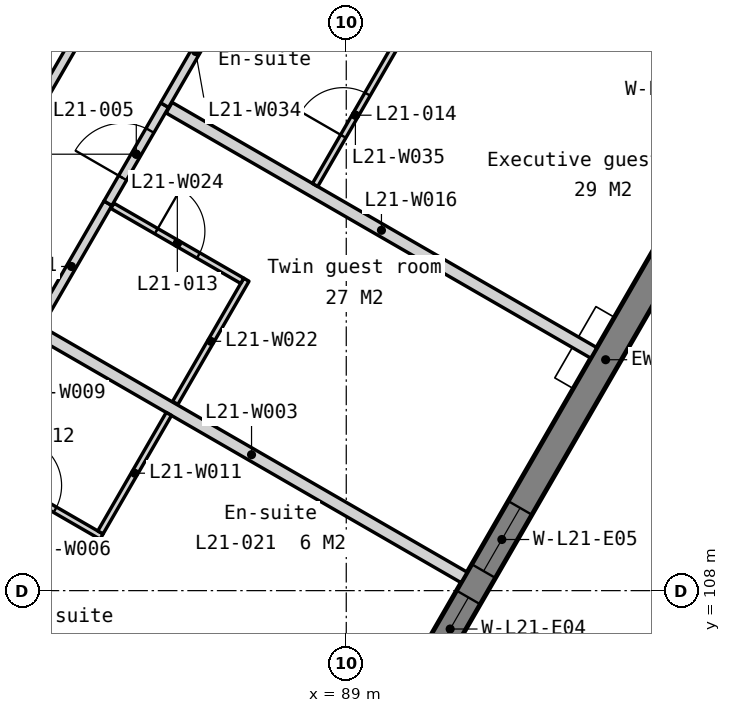
"""IFC4 building model, lengths in metres.
Left out: names, types, materials, properties, quantities, classifications, styles, units other than length and angle.
Written with IfcOpenShell. Run it as: python <this file> out.ifc"""

import sys

from ifc_helpers import new_model, si_unit, direction, frame, frame_2d, origin, place, context, subcontext, project, spatial, polyline, rectangle, outline, extrude, element, fill, save


model = new_model("IFC4")
c1 = context("Model", 3, precision=1e-05, world=origin(), true_north=direction((0.0, 1.0)))
c2 = subcontext(c1, "Body", "Model", "MODEL_VIEW")
j1 = project(units=[si_unit("LENGTHUNIT", "METRE"), si_unit("PLANEANGLEUNIT", "RADIAN")], contexts=[c1])
p1 = place(None, origin())
s1 = spatial("IfcSite", under=j1, at=p1, CompositionType="ELEMENT")
p2 = place(p1, origin())
s2 = spatial("IfcBuilding", under=s1, at=p2, CompositionType="ELEMENT")
p3 = place(p2, frame((0.0, 0.0, 88.8)))
s3 = spatial("IfcBuildingStorey", under=s2, at=p3, CompositionType="ELEMENT", Elevation=88.8)
p4 = place(p3, frame((82.605, 93.333, -0.15), z_axis=(0.0, 0.0, 1.0), x_axis=(0.500000478905, 0.866025127289, 0.0)))
e1 = element("IfcWall", 1, at=p4, inside=s3, PredefinedType="SOLIDWALL", context=c2, shape_type="SweptSolid", body=[
    extrude(outline(polyline([(42.643, 0.0), (42.643, 3.5), (0.0, 3.5), (0.0, 0.0), (42.643, 0.0)])), frame((0.0, 0.225, 0.0), z_axis=(0.0, -1.0, 0.0), x_axis=(1.0, 0.0, 0.0)), (0.0, 0.0, 1.0), 0.45),
])
p5 = place(p4, frame((0.72, 0.0, 1.05)))
e2 = element("IfcOpeningElement", 2, at=p5, cuts=e1, PredefinedType="OPENING", context=c2, shape_type="SweptSolid", body=[
    extrude(rectangle(XDim=1.2, YDim=1.5, at=frame_2d((0.6, 0.75))), frame((0.0, 0.235, 0.0), z_axis=(0.0, -1.0, 0.0), x_axis=(1.0, 0.0, 0.0)), (0.0, 0.0, 1.0), 0.47),
])
p6 = place(p4, frame((7.079, 0.0, 1.05)))
e3 = element("IfcOpeningElement", 3, at=p6, cuts=e1, PredefinedType="OPENING", context=c2, shape_type="SweptSolid", body=[
    extrude(rectangle(XDim=1.2, YDim=1.5, at=frame_2d((0.6, 0.75))), frame((0.0, 0.235, 0.0), z_axis=(0.0, -1.0, 0.0), x_axis=(1.0, 0.0, 0.0)), (0.0, 0.0, 1.0), 0.47),
])
p7 = place(p4, frame((8.779, 0.0, 1.05)))
e4 = element("IfcOpeningElement", 4, at=p7, cuts=e1, PredefinedType="OPENING", context=c2, shape_type="SweptSolid", body=[
    extrude(rectangle(XDim=1.2, YDim=1.5, at=frame_2d((0.6, 0.75))), frame((0.0, 0.235, 0.0), z_axis=(0.0, -1.0, 0.0), x_axis=(1.0, 0.0, 0.0)), (0.0, 0.0, 1.0), 0.47),
])
p8 = place(p4, frame((15.607, 0.0, 1.05)))
e5 = element("IfcOpeningElement", 5, at=p8, cuts=e1, PredefinedType="OPENING", context=c2, shape_type="SweptSolid", body=[
    extrude(rectangle(XDim=1.2, YDim=1.5, at=frame_2d((0.6, 0.75))), frame((0.0, 0.235, 0.0), z_axis=(0.0, -1.0, 0.0), x_axis=(1.0, 0.0, 0.0)), (0.0, 0.0, 1.0), 0.47),
])
p9 = place(p4, frame((17.307, 0.0, 1.05)))
e6 = element("IfcOpeningElement", 6, at=p9, cuts=e1, PredefinedType="OPENING", context=c2, shape_type="SweptSolid", body=[
    extrude(rectangle(XDim=1.2, YDim=1.5, at=frame_2d((0.6, 0.75))), frame((0.0, 0.235, 0.0), z_axis=(0.0, -1.0, 0.0), x_axis=(1.0, 0.0, 0.0)), (0.0, 0.0, 1.0), 0.47),
])
p10 = place(p4, frame((24.136, 0.0, 1.05)))
e7 = element("IfcOpeningElement", 7, at=p10, cuts=e1, PredefinedType="OPENING", context=c2, shape_type="SweptSolid", body=[
    extrude(rectangle(XDim=1.2, YDim=1.5, at=frame_2d((0.6, 0.75))), frame((0.0, 0.235, 0.0), z_axis=(0.0, -1.0, 0.0), x_axis=(1.0, 0.0, 0.0)), (0.0, 0.0, 1.0), 0.47),
])
p11 = place(p4, frame((25.836, 0.0, 1.05)))
e8 = element("IfcOpeningElement", 8, at=p11, cuts=e1, PredefinedType="OPENING", context=c2, shape_type="SweptSolid", body=[
    extrude(rectangle(XDim=1.2, YDim=1.5, at=frame_2d((0.6, 0.75))), frame((0.0, 0.235, 0.0), z_axis=(0.0, -1.0, 0.0), x_axis=(1.0, 0.0, 0.0)), (0.0, 0.0, 1.0), 0.47),
])
p12 = place(p4, frame((32.665, 0.0, 1.05)))
e9 = element("IfcOpeningElement", 9, at=p12, cuts=e1, PredefinedType="OPENING", context=c2, shape_type="SweptSolid", body=[
    extrude(rectangle(XDim=1.2, YDim=1.5, at=frame_2d((0.6, 0.75))), frame((0.0, 0.235, 0.0), z_axis=(0.0, -1.0, 0.0), x_axis=(1.0, 0.0, 0.0)), (0.0, 0.0, 1.0), 0.47),
])
p13 = place(p4, frame((34.365, 0.0, 1.05)))
e10 = element("IfcOpeningElement", 10, at=p13, cuts=e1, PredefinedType="OPENING", context=c2, shape_type="SweptSolid", body=[
    extrude(rectangle(XDim=1.2, YDim=1.5, at=frame_2d((0.6, 0.75))), frame((0.0, 0.235, 0.0), z_axis=(0.0, -1.0, 0.0), x_axis=(1.0, 0.0, 0.0)), (0.0, 0.0, 1.0), 0.47),
])
p14 = place(p4, frame((40.722, 0.0, 1.05)))
e11 = element("IfcOpeningElement", 11, at=p14, cuts=e1, PredefinedType="OPENING", context=c2, shape_type="SweptSolid", body=[
    extrude(rectangle(XDim=1.2, YDim=1.5, at=frame_2d((0.6, 0.75))), frame((0.0, 0.235, 0.0), z_axis=(0.0, -1.0, 0.0), x_axis=(1.0, 0.0, 0.0)), (0.0, 0.0, 1.0), 0.47),
])
p15 = place(p3, frame((83.946, 112.255, 0.0), z_axis=(0.0, 0.0, 1.0), x_axis=(0.86603353517, -0.499985915763, 0.0)))
e12 = element("IfcWall", 12, at=p15, inside=s3, PredefinedType="PARTITIONING", context=c2, shape_type="SweptSolid", body=[
    extrude(rectangle(XDim=8.075, YDim=0.2, at=frame_2d((4.038, 0.0))), origin(), (0.0, 0.0, 1.0), 3.35),
])
p16 = place(p3, frame((82.754, 110.171, 0.0), z_axis=(0.0, 0.0, 1.0), x_axis=(0.866038183914, -0.499977863513, 0.0)))
e13 = element("IfcWall", 13, at=p16, inside=s3, PredefinedType="PARTITIONING", context=c2, shape_type="SweptSolid", body=[
    extrude(rectangle(XDim=2.565, YDim=0.1, at=frame_2d((1.282, 0.0))), origin(), (0.0, 0.0, 1.0), 3.35),
])
p17 = place(p16, frame((0.883, 0.0, 0.0)))
e14 = element("IfcOpeningElement", 14, at=p17, cuts=e13, PredefinedType="OPENING", context=c2, shape_type="SweptSolid", body=[
    extrude(rectangle(XDim=0.8, YDim=2.1, at=frame_2d((0.4, 1.05))), frame((0.0, 0.06, 0.0), z_axis=(0.0, -1.0, 0.0), x_axis=(1.0, 0.0, 0.0)), (0.0, 0.0, 1.0), 0.12),
])
p18 = place(p3, frame((84.958, 108.957, 0.0), z_axis=(0.0, 0.0, 1.0), x_axis=(0.499966648284, 0.866044658551, 0.0)))
e15 = element("IfcWall", 15, at=p18, inside=s3, PredefinedType="PARTITIONING", context=c2, shape_type="SweptSolid", body=[
    extrude(rectangle(XDim=2.25, YDim=0.1, at=frame_2d((1.125, 0.0))), origin(), (0.0, 0.0, 1.0), 3.35),
])
p19 = place(p3, frame((86.087, 115.943, 0.0), z_axis=(0.0, 0.0, 1.0), x_axis=(0.866010152247, -0.500026415507, 0.0)))
e16 = element("IfcWall", 16, at=p19, inside=s3, PredefinedType="PARTITIONING", context=c2, shape_type="SweptSolid", body=[
    extrude(rectangle(XDim=8.065, YDim=0.2, at=frame_2d((4.032, 0.0))), origin(), (0.0, 0.0, 1.0), 3.35),
])
p20 = place(p3, frame((83.881, 112.292, 0.0), z_axis=(0.0, 0.0, 1.0), x_axis=(0.500001309137, 0.866024647952, 0.0)))
e17 = element("IfcWall", 17, at=p20, inside=s3, PredefinedType="PARTITIONING", context=c2, shape_type="SweptSolid", body=[
    extrude(rectangle(XDim=2.4, YDim=0.15, at=frame_2d((1.2, 0.0))), origin(), (0.0, 0.0, 1.0), 3.35),
])
p21 = place(p3, frame((86.188, 111.088, 0.0), z_axis=(0.0, 0.0, 1.0), x_axis=(0.499999433879, 0.866025730634, 0.0)))
e18 = element("IfcWall", 18, at=p21, inside=s3, PredefinedType="PARTITIONING", context=c2, shape_type="SweptSolid", body=[
    extrude(rectangle(XDim=2.34, YDim=0.1, at=frame_2d((1.17, 0.0))), origin(), (0.0, 0.0, 1.0), 3.35),
])
p22 = place(p3, frame((85.154, 114.328, 0.0), z_axis=(0.0, 0.0, 1.0), x_axis=(0.866040446274, -0.499973944738, 0.0)))
e19 = element("IfcWall", 19, at=p22, inside=s3, PredefinedType="PARTITIONING", context=c2, shape_type="SweptSolid", body=[
    extrude(rectangle(XDim=2.465, YDim=0.1, at=frame_2d((1.232, 0.0))), origin(), (0.0, 0.0, 1.0), 3.35),
])
p23 = place(p22, frame((0.833, 0.0, 0.0)))
e20 = element("IfcOpeningElement", 20, at=p23, cuts=e19, PredefinedType="OPENING", context=c2, shape_type="SweptSolid", body=[
    extrude(rectangle(XDim=0.8, YDim=2.1, at=frame_2d((0.4, 1.05))), frame((0.0, 0.06, 0.0), z_axis=(0.0, -1.0, 0.0), x_axis=(1.0, 0.0, 0.0)), (0.0, 0.0, 1.0), 0.12),
])
p24 = place(p3, frame((85.081, 114.371, 0.0), z_axis=(0.0, 0.0, 1.0), x_axis=(0.499941596792, 0.866059120267, 0.0)))
e21 = element("IfcWall", 21, at=p24, inside=s3, PredefinedType="PARTITIONING", context=c2, shape_type="SweptSolid", body=[
    extrude(rectangle(XDim=1.865, YDim=0.15, at=frame_2d((0.932, 0.0))), origin(), (0.0, 0.0, 1.0), 3.35),
])
p25 = place(p24, frame((0.482, 0.0, 0.0)))
e22 = element("IfcOpeningElement", 22, at=p25, cuts=e21, PredefinedType="OPENING", context=c2, shape_type="SweptSolid", body=[
    extrude(rectangle(XDim=0.9, YDim=2.1, at=frame_2d((0.45, 1.05))), frame((0.0, 0.085, 0.0), z_axis=(0.0, -1.0, 0.0), x_axis=(1.0, 0.0, 0.0)), (0.0, 0.0, 1.0), 0.17),
])
p26 = place(p3, frame((86.013, 115.985, 0.0), z_axis=(0.0, 0.0, 1.0), x_axis=(0.499992114976, 0.866029956157, 0.0)))
e23 = element("IfcWall", 23, at=p26, inside=s3, PredefinedType="PARTITIONING", context=c2, shape_type="SweptSolid", body=[
    extrude(rectangle(XDim=2.038, YDim=0.15, at=frame_2d((1.019, 0.0))), origin(), (0.0, 0.0, 1.0), 3.35),
])
p27 = place(p3, frame((88.488, 114.672, 0.0), z_axis=(0.0, 0.0, 1.0), x_axis=(0.499993606316, 0.866029095148, 0.0)))
e24 = element("IfcWall", 24, at=p27, inside=s3, PredefinedType="PARTITIONING", context=c2, shape_type="SweptSolid", body=[
    extrude(rectangle(XDim=2.65, YDim=0.1, at=frame_2d((1.325, 0.0))), origin(), (0.0, 0.0, 1.0), 3.35),
])
p28 = place(p27, frame((0.925, 0.0, 0.0)))
e25 = element("IfcOpeningElement", 25, at=p28, cuts=e24, PredefinedType="OPENING", context=c2, shape_type="SweptSolid", body=[
    extrude(rectangle(XDim=0.8, YDim=2.1, at=frame_2d((0.4, 1.05))), frame((0.0, 0.06, 0.0), z_axis=(0.0, -1.0, 0.0), x_axis=(1.0, 0.0, 0.0)), (0.0, 0.0, 1.0), 0.12),
])
p29 = place(p3, frame((80.065, 109.283, 0.0), z_axis=(0.0, 0.0, 1.0), x_axis=(0.49999841397, 0.866026319477, 0.0)))
e26 = element("IfcWall", 26, at=p29, inside=s3, PredefinedType="PARTITIONING", context=c2, shape_type="SweptSolid", body=[
    extrude(rectangle(XDim=9.777, YDim=0.15, at=frame_2d((4.888, 0.0))), origin(), (0.0, 0.0, 1.0), 3.35),
])
p30 = place(p8, origin())
e27 = element("IfcWindow", 27, at=p30, inside=s3, PartitioningType="SINGLE_PANEL", PredefinedType="WINDOW", context=c2, shape_type="SweptSolid", body=[
    extrude(rectangle(XDim=1.2, YDim=1.5, at=frame_2d((0.6, 0.75))), frame((0.0, 0.03, 0.0), z_axis=(0.0, -1.0, 0.0), x_axis=(1.0, 0.0, 0.0)), (0.0, 0.0, 1.0), 0.06),
])
fill(e5, e27)
p31 = place(p9, origin())
e28 = element("IfcWindow", 28, at=p31, inside=s3, PartitioningType="SINGLE_PANEL", PredefinedType="WINDOW", context=c2, shape_type="SweptSolid", body=[
    extrude(rectangle(XDim=1.2, YDim=1.5, at=frame_2d((0.6, 0.75))), frame((0.0, 0.03, 0.0), z_axis=(0.0, -1.0, 0.0), x_axis=(1.0, 0.0, 0.0)), (0.0, 0.0, 1.0), 0.06),
])
fill(e6, e28)
p32 = place(p25, origin())
e29 = element("IfcDoor", 29, at=p32, inside=s3, OperationType="SINGLE_SWING_LEFT", PredefinedType="DOOR", context=c2, shape_type="SweptSolid", body=[
    extrude(rectangle(XDim=0.9, YDim=2.1, at=frame_2d((0.45, 1.05))), frame((0.0, 0.025, 0.0), z_axis=(0.0, -1.0, 0.0), x_axis=(1.0, 0.0, 0.0)), (0.0, 0.0, 1.0), 0.05),
])
fill(e22, e29)
p33 = place(p17, origin())
e30 = element("IfcDoor", 30, at=p33, inside=s3, OperationType="SINGLE_SWING_LEFT", PredefinedType="DOOR", context=c2, shape_type="SweptSolid", body=[
    extrude(rectangle(XDim=0.8, YDim=2.1, at=frame_2d((0.4, 1.05))), frame((0.0, 0.025, 0.0), z_axis=(0.0, -1.0, 0.0), x_axis=(1.0, 0.0, 0.0)), (0.0, 0.0, 1.0), 0.05),
])
fill(e14, e30)
p34 = place(p23, origin())
e31 = element("IfcDoor", 31, at=p34, inside=s3, OperationType="SINGLE_SWING_LEFT", PredefinedType="DOOR", context=c2, shape_type="SweptSolid", body=[
    extrude(rectangle(XDim=0.8, YDim=2.1, at=frame_2d((0.4, 1.05))), frame((0.0, 0.025, 0.0), z_axis=(0.0, -1.0, 0.0), x_axis=(1.0, 0.0, 0.0)), (0.0, 0.0, 1.0), 0.05),
])
fill(e20, e31)
p35 = place(p28, origin())
e32 = element("IfcDoor", 32, at=p35, inside=s3, OperationType="SINGLE_SWING_LEFT", PredefinedType="DOOR", context=c2, shape_type="SweptSolid", body=[
    extrude(rectangle(XDim=0.8, YDim=2.1, at=frame_2d((0.4, 1.05))), frame((0.0, 0.025, 0.0), z_axis=(0.0, -1.0, 0.0), x_axis=(1.0, 0.0, 0.0)), (0.0, 0.0, 1.0), 0.05),
])
fill(e25, e32)
save(model, sys.argv[1])
